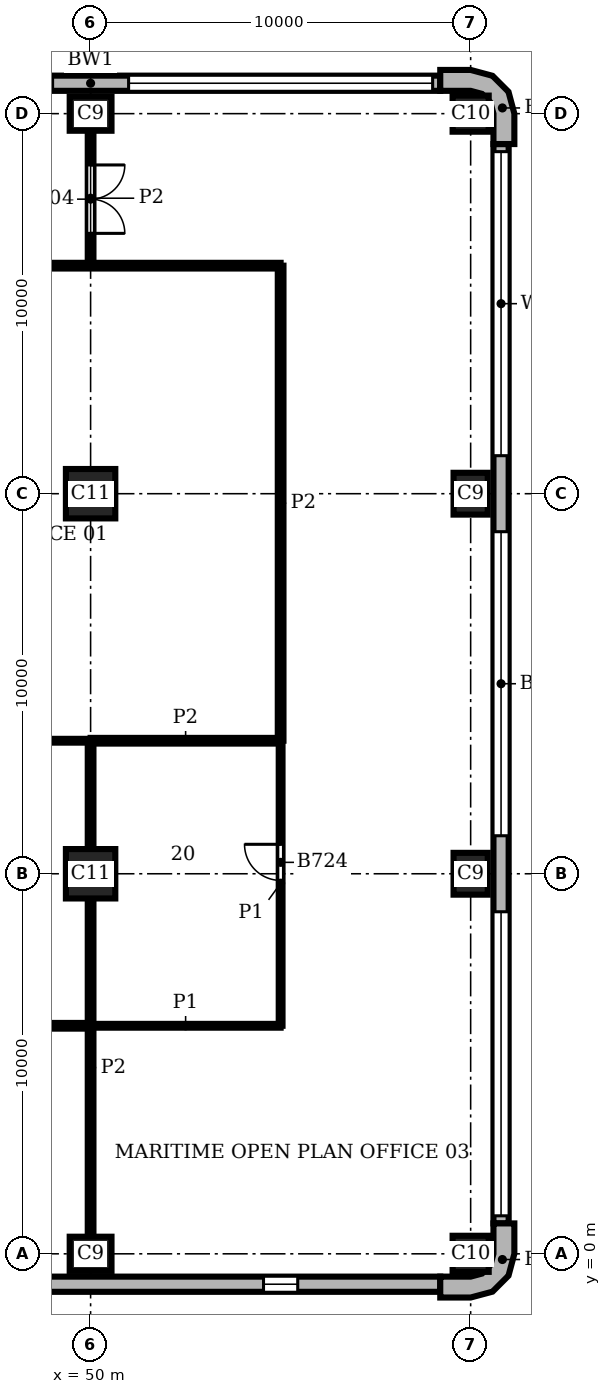
"""IFC4 building model, lengths in metres.
Left out: names, types, materials, properties, quantities, classifications, styles, units other than length and angle.
Written with IfcOpenShell. Run it as: python <this file> out.ifc"""

import sys

from ifc_helpers import new_model, si_unit, direction, frame, frame_2d, origin, origin_2d, place, context, subcontext, project, spatial, polyline, rectangle, outline, extrude, element, fill, save


model = new_model("IFC4")
c1 = context("Model", 3, precision=1e-05, world=origin(), true_north=direction((0.0, 1.0)))
c2 = subcontext(c1, "Body", "Model", "MODEL_VIEW")
j1 = project(units=[si_unit("LENGTHUNIT", "METRE"), si_unit("PLANEANGLEUNIT", "RADIAN")], contexts=[c1])
p1 = place(None, origin())
s1 = spatial("IfcSite", under=j1, at=p1, CompositionType="ELEMENT")
p2 = place(p1, origin())
s2 = spatial("IfcBuilding", under=s1, at=p2, CompositionType="ELEMENT")
p3 = place(p2, frame((0.0, 0.0, 209.7)))
s3 = spatial("IfcBuildingStorey", under=s2, at=p3, CompositionType="ELEMENT", Elevation=209.7)
p4 = place(p3, frame((50.0, 0.0, 0.0), z_axis=(0.0, 0.0, 1.0), x_axis=(1.0, 0.0, 0.0)))
e1 = element("IfcColumn", 1, at=p4, inside=s3, PredefinedType="COLUMN", context=c2, shape_type="SweptSolid", body=[
    extrude(rectangle(XDim=1.1, YDim=0.9, at=origin_2d()), origin(), (0.0, 0.0, 1.0), 3.9),
])
p5 = place(p3, frame((60.0, 0.0, 0.0), z_axis=(0.0, 0.0, 1.0), x_axis=(1.0, 0.0, 0.0)))
e2 = element("IfcColumn", 2, at=p5, inside=s3, PredefinedType="COLUMN", context=c2, shape_type="SweptSolid", body=[
    extrude(rectangle(XDim=0.95, YDim=0.95, at=origin_2d()), origin(), (0.0, 0.0, 1.0), 3.9),
])
for number, where, z_axis, x_axis in (
    (3, (60.0, 10.0, 0.0), (0.0, 0.0, 1.0), (0.0, 1.0, 0.0)),
    (4, (60.0, 20.0, 0.0), (0.0, 0.0, 1.0), (0.0, 1.0, 0.0)),
):
    element("IfcColumn", number, at=place(p3, frame(where, z_axis=z_axis, x_axis=x_axis)), inside=s3, PredefinedType="COLUMN", context=c2, shape_type="SweptSolid", body=[
        extrude(rectangle(XDim=1.1, YDim=0.9, at=origin_2d()), origin(), (0.0, 0.0, 1.0), 3.9),
    ])
p6 = place(p3, frame((60.0, 30.0, 0.0), z_axis=(0.0, 0.0, 1.0), x_axis=(1.0, 0.0, 0.0)))
e5 = element("IfcColumn", 5, at=p6, inside=s3, PredefinedType="COLUMN", context=c2, shape_type="SweptSolid", body=[
    extrude(rectangle(XDim=0.95, YDim=0.95, at=origin_2d()), origin(), (0.0, 0.0, 1.0), 3.9),
])
p7 = place(p3, frame((50.0, 30.0, 0.0), z_axis=(0.0, 0.0, 1.0), x_axis=(1.0, 0.0, 0.0)))
e6 = element("IfcColumn", 6, at=p7, inside=s3, PredefinedType="COLUMN", context=c2, shape_type="SweptSolid", body=[
    extrude(rectangle(XDim=1.1, YDim=0.9, at=origin_2d()), origin(), (0.0, 0.0, 1.0), 3.9),
])
for number, where, z_axis, x_axis in (
    (7, (50.0, 10.0, 0.0), (0.0, 0.0, 1.0), (1.0, 0.0, 0.0)),
    (8, (50.0, 20.0, 0.0), (0.0, 0.0, 1.0), (1.0, 0.0, 0.0)),
):
    element("IfcColumn", number, at=place(p3, frame(where, z_axis=z_axis, x_axis=x_axis)), inside=s3, PredefinedType="COLUMN", context=c2, shape_type="SweptSolid", body=[
        extrude(rectangle(XDim=1.3, YDim=1.3, at=origin_2d()), origin(), (0.0, 0.0, 1.0), 3.9),
    ])
p8 = place(p3, origin())
e9 = element("IfcWall", 9, at=p8, inside=s3, PredefinedType="SOLIDWALL", context=c2, shape_type="SweptSolid", body=[
    extrude(outline(polyline([(59.2, -1.0), (59.2, -1.15), (60.0, -1.15), (60.575, -0.996), (60.996, -0.575), (61.15, 0.0), (61.15, 0.8), (61.0, 0.8), (60.6, 0.8), (60.6, 0.0), (60.52, -0.3), (60.3, -0.52), (60.0, -0.6), (59.2, -0.6), (59.2, -1.0)])), origin(), (0.0, 0.0, 1.0), 3.9),
])
e10 = element("IfcWall", 10, at=p8, inside=s3, PredefinedType="SOLIDWALL", context=c2, shape_type="SweptSolid", body=[
    extrude(outline(polyline([(61.0, 29.2), (61.15, 29.2), (61.15, 30.0), (60.996, 30.575), (60.575, 30.996), (60.0, 31.15), (59.2, 31.15), (59.2, 31.0), (59.2, 30.6), (60.0, 30.6), (60.3, 30.52), (60.52, 30.3), (60.6, 30.0), (60.6, 29.2), (61.0, 29.2)])), origin(), (0.0, 0.0, 1.0), 3.9),
])
p9 = place(p3, frame((20.8, -0.8, 0.0), z_axis=(0.0, 0.0, 1.0), x_axis=(1.0, 0.0, 0.0)))
e11 = element("IfcWall", 11, at=p9, inside=s3, PredefinedType="SOLIDWALL", context=c2, shape_type="SweptSolid", body=[
    extrude(rectangle(XDim=38.4, YDim=0.4, at=frame_2d((19.2, 0.0))), origin(), (0.0, 0.0, 1.0), 3.9),
])
p10 = place(p9, frame((3.75, 0.0, 0.9)))
e12 = element("IfcOpeningElement", 12, at=p10, cuts=e11, PredefinedType="OPENING", context=c2, shape_type="SweptSolid", body=[
    extrude(rectangle(XDim=0.9, YDim=2.35, at=frame_2d((0.45, 1.175))), frame((0.0, 0.21, 0.0), z_axis=(0.0, -1.0, 0.0), x_axis=(1.0, 0.0, 0.0)), (0.0, 0.0, 1.0), 0.42),
])
p11 = place(p9, frame((13.75, 0.0, 0.9)))
e13 = element("IfcOpeningElement", 13, at=p11, cuts=e11, PredefinedType="OPENING", context=c2, shape_type="SweptSolid", body=[
    extrude(rectangle(XDim=0.9, YDim=2.35, at=frame_2d((0.45, 1.175))), frame((0.0, 0.21, 0.0), z_axis=(0.0, -1.0, 0.0), x_axis=(1.0, 0.0, 0.0)), (0.0, 0.0, 1.0), 0.42),
])
p12 = place(p9, frame((23.75, 0.0, 0.9)))
e14 = element("IfcOpeningElement", 14, at=p12, cuts=e11, PredefinedType="OPENING", context=c2, shape_type="SweptSolid", body=[
    extrude(rectangle(XDim=0.9, YDim=2.35, at=frame_2d((0.45, 1.175))), frame((0.0, 0.21, 0.0), z_axis=(0.0, -1.0, 0.0), x_axis=(1.0, 0.0, 0.0)), (0.0, 0.0, 1.0), 0.42),
])
p13 = place(p9, frame((33.75, 0.0, 0.9)))
e15 = element("IfcOpeningElement", 15, at=p13, cuts=e11, PredefinedType="OPENING", context=c2, shape_type="SweptSolid", body=[
    extrude(rectangle(XDim=0.9, YDim=2.35, at=frame_2d((0.45, 1.175))), frame((0.0, 0.21, 0.0), z_axis=(0.0, -1.0, 0.0), x_axis=(1.0, 0.0, 0.0)), (0.0, 0.0, 1.0), 0.42),
])
p14 = place(p3, frame((60.8, 0.8, 0.0), z_axis=(0.0, 0.0, 1.0), x_axis=(0.0, 1.0, 0.0)))
e16 = element("IfcWall", 16, at=p14, inside=s3, PredefinedType="SOLIDWALL", context=c2, shape_type="SweptSolid", body=[
    extrude(rectangle(XDim=28.4, YDim=0.4, at=frame_2d((14.2, 0.0))), origin(), (0.0, 0.0, 1.0), 3.9),
])
p15 = place(p14, frame((0.2, 0.0, 0.9)))
e17 = element("IfcOpeningElement", 17, at=p15, cuts=e16, PredefinedType="OPENING", context=c2, shape_type="SweptSolid", body=[
    extrude(rectangle(XDim=8.0, YDim=2.35, at=frame_2d((4.0, 1.175))), frame((0.0, 0.21, 0.0), z_axis=(0.0, -1.0, 0.0), x_axis=(1.0, 0.0, 0.0)), (0.0, 0.0, 1.0), 0.42),
])
p16 = place(p14, frame((10.2, 0.0, 0.9)))
e18 = element("IfcOpeningElement", 18, at=p16, cuts=e16, PredefinedType="OPENING", context=c2, shape_type="SweptSolid", body=[
    extrude(rectangle(XDim=8.0, YDim=2.35, at=frame_2d((4.0, 1.175))), frame((0.0, 0.21, 0.0), z_axis=(0.0, -1.0, 0.0), x_axis=(1.0, 0.0, 0.0)), (0.0, 0.0, 1.0), 0.42),
])
p17 = place(p14, frame((20.2, 0.0, 0.9)))
e19 = element("IfcOpeningElement", 19, at=p17, cuts=e16, PredefinedType="OPENING", context=c2, shape_type="SweptSolid", body=[
    extrude(rectangle(XDim=8.0, YDim=2.35, at=frame_2d((4.0, 1.175))), frame((0.0, 0.21, 0.0), z_axis=(0.0, -1.0, 0.0), x_axis=(1.0, 0.0, 0.0)), (0.0, 0.0, 1.0), 0.42),
])
p18 = place(p3, frame((59.2, 30.8, 0.0), z_axis=(0.0, 0.0, 1.0), x_axis=(-1.0, 0.0, 0.0)))
e20 = element("IfcWall", 20, at=p18, inside=s3, PredefinedType="SOLIDWALL", context=c2, shape_type="SweptSolid", body=[
    extrude(rectangle(XDim=18.4, YDim=0.4, at=frame_2d((9.2, 0.0))), origin(), (0.0, 0.0, 1.0), 3.9),
])
p19 = place(p18, frame((0.2, 0.0, 0.9)))
e21 = element("IfcOpeningElement", 21, at=p19, cuts=e20, PredefinedType="OPENING", context=c2, shape_type="SweptSolid", body=[
    extrude(rectangle(XDim=8.0, YDim=2.35, at=frame_2d((4.0, 1.175))), frame((0.0, 0.21, 0.0), z_axis=(0.0, -1.0, 0.0), x_axis=(1.0, 0.0, 0.0)), (0.0, 0.0, 1.0), 0.42),
])
p20 = place(p18, frame((10.2, 0.0, 0.9)))
e22 = element("IfcOpeningElement", 22, at=p20, cuts=e20, PredefinedType="OPENING", context=c2, shape_type="SweptSolid", body=[
    extrude(rectangle(XDim=8.0, YDim=2.35, at=frame_2d((4.0, 1.175))), frame((0.0, 0.21, 0.0), z_axis=(0.0, -1.0, 0.0), x_axis=(1.0, 0.0, 0.0)), (0.0, 0.0, 1.0), 0.42),
])
p21 = place(p3, frame((55.0, 6.0, 0.0), z_axis=(0.0, 0.0, 1.0), x_axis=(0.0, 1.0, 0.0)))
e23 = element("IfcWall", 23, at=p21, inside=s3, PredefinedType="PARTITIONING", context=c2, shape_type="SweptSolid", body=[
    extrude(rectangle(XDim=7.5, YDim=0.1, at=frame_2d((3.75, 0.0))), origin(), (0.0, 0.0, 1.0), 3.58),
])
p22 = place(p21, frame((3.825, 0.0, 0.0)))
e24 = element("IfcOpeningElement", 24, at=p22, cuts=e23, PredefinedType="OPENING", context=c2, shape_type="SweptSolid", body=[
    extrude(rectangle(XDim=0.95, YDim=2.1, at=frame_2d((0.475, 1.05))), frame((0.0, 0.06, 0.0), z_axis=(0.0, -1.0, 0.0), x_axis=(1.0, 0.0, 0.0)), (0.0, 0.0, 1.0), 0.12),
])
p23 = place(p3, frame((50.0, 6.0, 0.0), z_axis=(0.0, 0.0, 1.0), x_axis=(1.0, 0.0, 0.0)))
e25 = element("IfcWall", 25, at=p23, inside=s3, PredefinedType="PARTITIONING", context=c2, shape_type="SweptSolid", body=[
    extrude(rectangle(XDim=5.0, YDim=0.1, at=frame_2d((2.5, 0.0))), origin(), (0.0, 0.0, 1.0), 3.58),
])
p24 = place(p3, frame((45.0, 13.5, 0.0), z_axis=(0.0, 0.0, 1.0), x_axis=(1.0, 0.0, 0.0)))
e26 = element("IfcWall", 26, at=p24, inside=s3, PredefinedType="PARTITIONING", context=c2, shape_type="SweptSolid", body=[
    extrude(rectangle(XDim=5.0, YDim=0.1, at=frame_2d((2.5, 0.0))), origin(), (0.0, 0.0, 1.0), 3.58),
])
p25 = place(p24, frame((2.35, 0.0, 0.0)))
e27 = element("IfcOpeningElement", 27, at=p25, cuts=e26, PredefinedType="OPENING", context=c2, shape_type="SweptSolid", body=[
    extrude(rectangle(XDim=0.9, YDim=2.1, at=frame_2d((0.45, 1.05))), frame((0.0, 0.06, 0.0), z_axis=(0.0, -1.0, 0.0), x_axis=(1.0, 0.0, 0.0)), (0.0, 0.0, 1.0), 0.12),
])
p26 = place(p3, frame((50.0, 0.45, 0.0), z_axis=(0.0, 0.0, 1.0), x_axis=(0.0, 1.0, 0.0)))
e28 = element("IfcWall", 28, at=p26, inside=s3, PredefinedType="PARTITIONING", context=c2, shape_type="SweptSolid", body=[
    extrude(rectangle(XDim=8.9, YDim=0.15, at=frame_2d((4.45, 0.0))), origin(), (0.0, 0.0, 1.0), 3.58),
])
p27 = place(p3, frame((50.0, 10.65, 0.0), z_axis=(0.0, 0.0, 1.0), x_axis=(0.0, 1.0, 0.0)))
e29 = element("IfcWall", 29, at=p27, inside=s3, PredefinedType="PARTITIONING", context=c2, shape_type="SweptSolid", body=[
    extrude(rectangle(XDim=2.85, YDim=0.15, at=frame_2d((1.425, 0.0))), origin(), (0.0, 0.0, 1.0), 3.58),
])
p28 = place(p3, frame((50.0, 26.0, 0.0), z_axis=(0.0, 0.0, 1.0), x_axis=(0.0, 1.0, 0.0)))
e30 = element("IfcWall", 30, at=p28, inside=s3, PredefinedType="PARTITIONING", context=c2, shape_type="SweptSolid", body=[
    extrude(rectangle(XDim=3.55, YDim=0.15, at=frame_2d((1.775, 0.0))), origin(), (0.0, 0.0, 1.0), 3.58),
])
p29 = place(p28, frame((0.85, 0.0, 0.0)))
e31 = element("IfcOpeningElement", 31, at=p29, cuts=e30, PredefinedType="OPENING", context=c2, shape_type="SweptSolid", body=[
    extrude(rectangle(XDim=1.8, YDim=2.1, at=frame_2d((0.9, 1.05))), frame((0.0, 0.085, 0.0), z_axis=(0.0, -1.0, 0.0), x_axis=(1.0, 0.0, 0.0)), (0.0, 0.0, 1.0), 0.17),
])
p30 = place(p3, frame((55.0, 13.5, 0.0), z_axis=(0.0, 0.0, 1.0), x_axis=(0.0, 1.0, 0.0)))
e32 = element("IfcWall", 32, at=p30, inside=s3, PredefinedType="PARTITIONING", context=c2, shape_type="SweptSolid", body=[
    extrude(rectangle(XDim=12.5, YDim=0.15, at=frame_2d((6.25, 0.0))), origin(), (0.0, 0.0, 1.0), 3.58),
])
p31 = place(p3, frame((38.0, 6.0, 0.0), z_axis=(0.0, 0.0, 1.0), x_axis=(1.0, 0.0, 0.0)))
e33 = element("IfcWall", 33, at=p31, inside=s3, PredefinedType="PARTITIONING", context=c2, shape_type="SweptSolid", body=[
    extrude(rectangle(XDim=12.0, YDim=0.15, at=frame_2d((6.0, 0.0))), origin(), (0.0, 0.0, 1.0), 3.58),
])
p32 = place(p3, frame((50.0, 13.5, 0.0), z_axis=(0.0, 0.0, 1.0), x_axis=(1.0, 0.0, 0.0)))
e34 = element("IfcWall", 34, at=p32, inside=s3, PredefinedType="PARTITIONING", context=c2, shape_type="SweptSolid", body=[
    extrude(rectangle(XDim=5.0, YDim=0.15, at=frame_2d((2.5, 0.0))), origin(), (0.0, 0.0, 1.0), 3.58),
])
p33 = place(p3, frame((33.2, 26.0, 0.0), z_axis=(0.0, 0.0, 1.0), x_axis=(1.0, 0.0, 0.0)))
e35 = element("IfcWall", 35, at=p33, inside=s3, PredefinedType="PARTITIONING", context=c2, shape_type="SweptSolid", body=[
    extrude(rectangle(XDim=21.8, YDim=0.15, at=frame_2d((10.9, 0.0))), origin(), (0.0, 0.0, 1.0), 3.58),
])
p34 = place(p33, frame((10.15, 0.0, 0.0)))
e36 = element("IfcOpeningElement", 36, at=p34, cuts=e35, PredefinedType="OPENING", context=c2, shape_type="SweptSolid", body=[
    extrude(rectangle(XDim=1.8, YDim=2.1, at=frame_2d((0.9, 1.05))), frame((0.0, 0.085, 0.0), z_axis=(0.0, -1.0, 0.0), x_axis=(1.0, 0.0, 0.0)), (0.0, 0.0, 1.0), 0.17),
])
p35 = place(p13, origin())
e37 = element("IfcWindow", 37, at=p35, inside=s3, PartitioningType="SINGLE_PANEL", PredefinedType="WINDOW", context=c2, shape_type="SweptSolid", body=[
    extrude(rectangle(XDim=0.9, YDim=2.35, at=frame_2d((0.45, 1.175))), frame((0.0, 0.16, 0.0), z_axis=(0.0, -1.0, 0.0), x_axis=(1.0, 0.0, 0.0)), (0.0, 0.0, 1.0), 0.06),
])
fill(e15, e37)
p36 = place(p15, origin())
e38 = element("IfcWindow", 38, at=p36, inside=s3, PartitioningType="SINGLE_PANEL", PredefinedType="WINDOW", context=c2, shape_type="SweptSolid", body=[
    extrude(rectangle(XDim=8.0, YDim=2.35, at=frame_2d((4.0, 1.175))), frame((0.0, 0.16, 0.0), z_axis=(0.0, -1.0, 0.0), x_axis=(1.0, 0.0, 0.0)), (0.0, 0.0, 1.0), 0.06),
])
fill(e17, e38)
p37 = place(p16, origin())
e39 = element("IfcWindow", 39, at=p37, inside=s3, PartitioningType="SINGLE_PANEL", PredefinedType="WINDOW", context=c2, shape_type="SweptSolid", body=[
    extrude(rectangle(XDim=8.0, YDim=2.35, at=frame_2d((4.0, 1.175))), frame((0.0, 0.16, 0.0), z_axis=(0.0, -1.0, 0.0), x_axis=(1.0, 0.0, 0.0)), (0.0, 0.0, 1.0), 0.06),
])
fill(e18, e39)
p38 = place(p17, origin())
e40 = element("IfcWindow", 40, at=p38, inside=s3, PartitioningType="SINGLE_PANEL", PredefinedType="WINDOW", context=c2, shape_type="SweptSolid", body=[
    extrude(rectangle(XDim=8.0, YDim=2.35, at=frame_2d((4.0, 1.175))), frame((0.0, 0.16, 0.0), z_axis=(0.0, -1.0, 0.0), x_axis=(1.0, 0.0, 0.0)), (0.0, 0.0, 1.0), 0.06),
])
fill(e19, e40)
p39 = place(p19, origin())
e41 = element("IfcWindow", 41, at=p39, inside=s3, PartitioningType="SINGLE_PANEL", PredefinedType="WINDOW", context=c2, shape_type="SweptSolid", body=[
    extrude(rectangle(XDim=8.0, YDim=2.35, at=frame_2d((4.0, 1.175))), frame((0.0, 0.16, 0.0), z_axis=(0.0, -1.0, 0.0), x_axis=(1.0, 0.0, 0.0)), (0.0, 0.0, 1.0), 0.06),
])
fill(e21, e41)
p40 = place(p29, frame((1.8, 0.0, 0.0), z_axis=(0.0, 0.0, 1.0), x_axis=(-1.0, 0.0, 0.0)))
e42 = element("IfcDoor", 42, at=p40, inside=s3, OperationType="DOUBLE_DOOR_SINGLE_SWING", PredefinedType="DOOR", context=c2, shape_type="SweptSolid", body=[
    extrude(rectangle(XDim=1.8, YDim=2.1, at=frame_2d((0.9, 1.05))), frame((0.0, 0.025, 0.0), z_axis=(0.0, -1.0, 0.0), x_axis=(1.0, 0.0, 0.0)), (0.0, 0.0, 1.0), 0.05),
])
fill(e31, e42)
p41 = place(p22, origin())
e43 = element("IfcDoor", 43, at=p41, inside=s3, OperationType="SINGLE_SWING_RIGHT", PredefinedType="DOOR", context=c2, shape_type="SweptSolid", body=[
    extrude(rectangle(XDim=0.95, YDim=2.1, at=frame_2d((0.475, 1.05))), frame((0.0, 0.025, 0.0), z_axis=(0.0, -1.0, 0.0), x_axis=(1.0, 0.0, 0.0)), (0.0, 0.0, 1.0), 0.05),
])
fill(e24, e43)
save(model, sys.argv[1])
